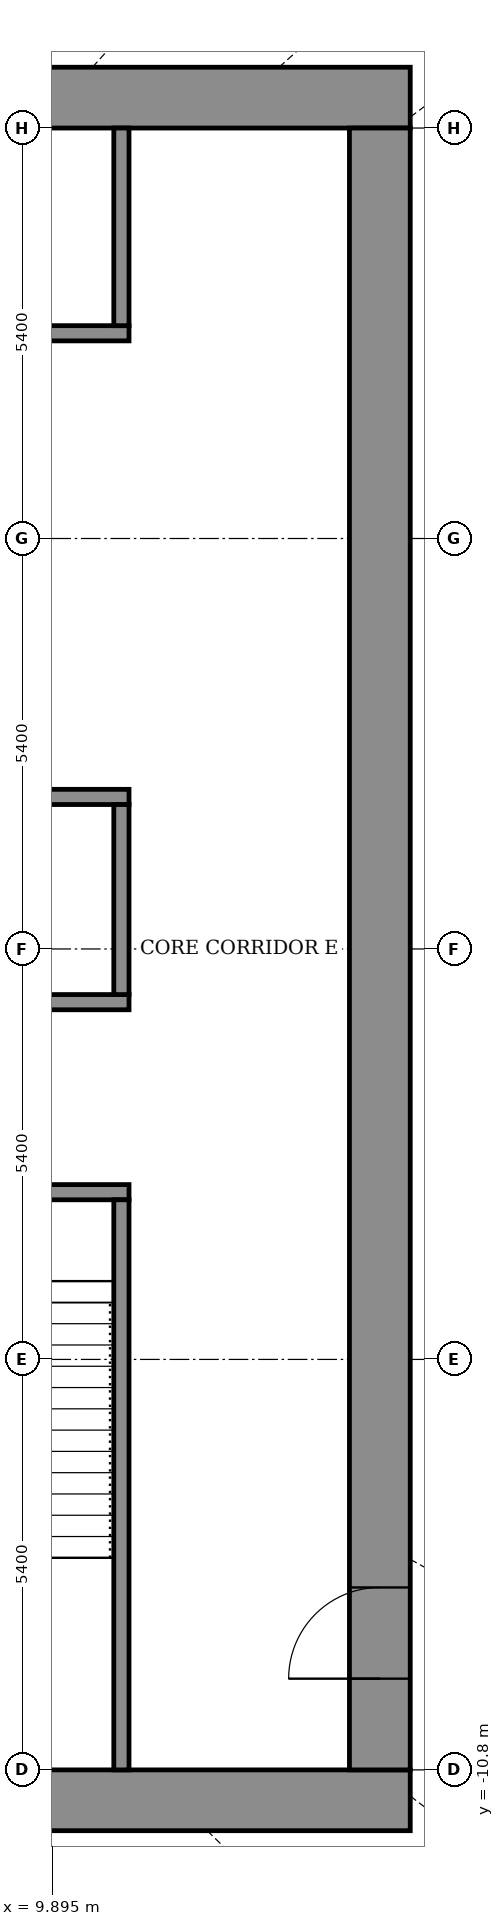
"""IFC4 building model, lengths in metres.
Left out: names, types, materials, properties, quantities, classifications, styles, units other than length and angle.
Written with IfcOpenShell. Run it as: python <this file> out.ifc"""

import sys

from ifc_helpers import new_model, si_unit, direction, frame, frame_2d, origin, place, context, subcontext, project, spatial, rectangle, extrude, element, fill, save


model = new_model("IFC4")
c1 = context("Model", 3, precision=1e-05, world=origin(), true_north=direction((0.0, 1.0)))
c2 = subcontext(c1, "Body", "Model", "MODEL_VIEW")
j1 = project(units=[si_unit("LENGTHUNIT", "METRE"), si_unit("PLANEANGLEUNIT", "RADIAN")], contexts=[c1])
p1 = place(None, origin())
s1 = spatial("IfcSite", under=j1, at=p1, CompositionType="ELEMENT")
p2 = place(p1, origin())
s2 = spatial("IfcBuilding", under=s1, at=p2, CompositionType="ELEMENT")
p3 = place(p2, frame((0.0, 0.0, 226.5)))
s3 = spatial("IfcBuildingStorey", under=s2, at=p3, CompositionType="ELEMENT", Elevation=226.5)
for number, where, z_axis, x_axis in (
    (1, (-14.6, -11.2, 0.0), (0.0, 0.0, 1.0), (1.0, 0.0, 0.0)),
    (2, (-14.6, 11.2, 0.0), (0.0, 0.0, 1.0), (1.0, 0.0, 0.0)),
):
    element("IfcWall", number, at=place(p3, frame(where, z_axis=z_axis, x_axis=x_axis)), inside=s3, PredefinedType="SHEAR", context=c2, shape_type="SweptSolid", body=[
        extrude(rectangle(XDim=29.2, YDim=0.8, at=frame_2d((14.6, 0.0))), origin(), (0.0, 0.0, 1.0), 4.6),
    ])
p4 = place(p3, frame((14.2, -10.8, 0.0), z_axis=(0.0, 0.0, 1.0), x_axis=(0.0, 1.0, 0.0)))
e3 = element("IfcWall", 3, at=p4, inside=s3, PredefinedType="SHEAR", context=c2, shape_type="SweptSolid", body=[
    extrude(rectangle(XDim=21.6, YDim=0.8, at=frame_2d((10.8, 0.0))), origin(), (0.0, 0.0, 1.0), 4.6),
])
p5 = place(p4, frame((1.2, 0.0, 0.0)))
e4 = element("IfcOpeningElement", 4, at=p5, cuts=e3, PredefinedType="OPENING", context=c2, shape_type="SweptSolid", body=[
    extrude(rectangle(XDim=1.2, YDim=2.1, at=frame_2d((0.6, 1.05))), frame((0.0, 0.41, 0.0), z_axis=(0.0, -1.0, 0.0), x_axis=(1.0, 0.0, 0.0)), (0.0, 0.0, 1.0), 0.82),
])
p6 = place(p3, frame((-10.9, -3.2, 0.0), z_axis=(0.0, 0.0, 1.0), x_axis=(1.0, 0.0, 0.0)))
e5 = element("IfcWall", 5, at=p6, inside=s3, PredefinedType="SHEAR", context=c2, shape_type="SweptSolid", body=[
    extrude(rectangle(XDim=21.8, YDim=0.2, at=frame_2d((10.9, 0.0))), origin(), (0.0, 0.0, 1.0), 4.05),
])
p7 = place(p6, frame((1.075, 0.0, 0.0)))
e6 = element("IfcOpeningElement", 6, at=p7, cuts=e5, PredefinedType="OPENING", context=c2, shape_type="SweptSolid", body=[
    extrude(rectangle(XDim=1.1, YDim=2.1, at=frame_2d((0.55, 1.05))), frame((0.0, 0.11, 0.0), z_axis=(0.0, -1.0, 0.0), x_axis=(1.0, 0.0, 0.0)), (0.0, 0.0, 1.0), 0.22),
])
p8 = place(p6, frame((10.325, 0.0, 0.0)))
e7 = element("IfcOpeningElement", 7, at=p8, cuts=e5, PredefinedType="OPENING", context=c2, shape_type="SweptSolid", body=[
    extrude(rectangle(XDim=1.1, YDim=2.1, at=frame_2d((0.55, 1.05))), frame((0.0, 0.11, 0.0), z_axis=(0.0, -1.0, 0.0), x_axis=(1.0, 0.0, 0.0)), (0.0, 0.0, 1.0), 0.22),
])
p9 = place(p6, frame((19.625, 0.0, 0.0)))
e8 = element("IfcOpeningElement", 8, at=p9, cuts=e5, PredefinedType="OPENING", context=c2, shape_type="SweptSolid", body=[
    extrude(rectangle(XDim=1.1, YDim=2.1, at=frame_2d((0.55, 1.05))), frame((0.0, 0.11, 0.0), z_axis=(0.0, -1.0, 0.0), x_axis=(1.0, 0.0, 0.0)), (0.0, 0.0, 1.0), 0.22),
])
p10 = place(p6, frame((5.7, 0.0, 0.0)))
e9 = element("IfcOpeningElement", 9, at=p10, cuts=e5, PredefinedType="OPENING", context=c2, shape_type="SweptSolid", body=[
    extrude(rectangle(XDim=1.1, YDim=2.1, at=frame_2d((0.55, 1.05))), frame((0.0, 0.11, 0.0), z_axis=(0.0, -1.0, 0.0), x_axis=(1.0, 0.0, 0.0)), (0.0, 0.0, 1.0), 0.22),
])
p11 = place(p6, frame((14.975, 0.0, 0.0)))
e10 = element("IfcOpeningElement", 10, at=p11, cuts=e5, PredefinedType="OPENING", context=c2, shape_type="SweptSolid", body=[
    extrude(rectangle(XDim=1.1, YDim=2.1, at=frame_2d((0.55, 1.05))), frame((0.0, 0.11, 0.0), z_axis=(0.0, -1.0, 0.0), x_axis=(1.0, 0.0, 0.0)), (0.0, 0.0, 1.0), 0.22),
])
p12 = place(p3, frame((-10.9, -0.7, 0.0), z_axis=(0.0, 0.0, 1.0), x_axis=(1.0, 0.0, 0.0)))
e11 = element("IfcWall", 11, at=p12, inside=s3, PredefinedType="SHEAR", context=c2, shape_type="SweptSolid", body=[
    extrude(rectangle(XDim=21.8, YDim=0.2, at=frame_2d((10.9, 0.0))), origin(), (0.0, 0.0, 1.0), 4.05),
])
p13 = place(p3, frame((-10.9, 2.0, 0.0), z_axis=(0.0, 0.0, 1.0), x_axis=(1.0, 0.0, 0.0)))
e12 = element("IfcWall", 12, at=p13, inside=s3, PredefinedType="SHEAR", context=c2, shape_type="SweptSolid", body=[
    extrude(rectangle(XDim=21.8, YDim=0.2, at=frame_2d((10.9, 0.0))), origin(), (0.0, 0.0, 1.0), 4.05),
])
p14 = place(p13, frame((4.95, 0.0, 0.0)))
e13 = element("IfcOpeningElement", 13, at=p14, cuts=e12, PredefinedType="OPENING", context=c2, shape_type="SweptSolid", body=[
    extrude(rectangle(XDim=1.1, YDim=2.1, at=frame_2d((0.55, 1.05))), frame((0.0, 0.11, 0.0), z_axis=(0.0, -1.0, 0.0), x_axis=(1.0, 0.0, 0.0)), (0.0, 0.0, 1.0), 0.22),
])
p15 = place(p13, frame((7.65, 0.0, 0.0)))
e14 = element("IfcOpeningElement", 14, at=p15, cuts=e12, PredefinedType="OPENING", context=c2, shape_type="SweptSolid", body=[
    extrude(rectangle(XDim=1.1, YDim=2.1, at=frame_2d((0.55, 1.05))), frame((0.0, 0.11, 0.0), z_axis=(0.0, -1.0, 0.0), x_axis=(1.0, 0.0, 0.0)), (0.0, 0.0, 1.0), 0.22),
])
p16 = place(p13, frame((10.35, 0.0, 0.0)))
e15 = element("IfcOpeningElement", 15, at=p16, cuts=e12, PredefinedType="OPENING", context=c2, shape_type="SweptSolid", body=[
    extrude(rectangle(XDim=1.1, YDim=2.1, at=frame_2d((0.55, 1.05))), frame((0.0, 0.11, 0.0), z_axis=(0.0, -1.0, 0.0), x_axis=(1.0, 0.0, 0.0)), (0.0, 0.0, 1.0), 0.22),
])
p17 = place(p13, frame((1.675, 0.0, 0.0)))
e16 = element("IfcOpeningElement", 16, at=p17, cuts=e12, PredefinedType="OPENING", context=c2, shape_type="SweptSolid", body=[
    extrude(rectangle(XDim=0.9, YDim=2.1, at=frame_2d((0.45, 1.05))), frame((0.0, 0.11, 0.0), z_axis=(0.0, -1.0, 0.0), x_axis=(1.0, 0.0, 0.0)), (0.0, 0.0, 1.0), 0.22),
])
p18 = place(p13, frame((16.525, 0.0, 0.0)))
e17 = element("IfcOpeningElement", 17, at=p18, cuts=e12, PredefinedType="OPENING", context=c2, shape_type="SweptSolid", body=[
    extrude(rectangle(XDim=0.9, YDim=2.1, at=frame_2d((0.45, 1.05))), frame((0.0, 0.11, 0.0), z_axis=(0.0, -1.0, 0.0), x_axis=(1.0, 0.0, 0.0)), (0.0, 0.0, 1.0), 0.22),
])
p19 = place(p3, frame((-10.9, 8.1, 0.0), z_axis=(0.0, 0.0, 1.0), x_axis=(1.0, 0.0, 0.0)))
e18 = element("IfcWall", 18, at=p19, inside=s3, PredefinedType="SHEAR", context=c2, shape_type="SweptSolid", body=[
    extrude(rectangle(XDim=21.8, YDim=0.2, at=frame_2d((10.9, 0.0))), origin(), (0.0, 0.0, 1.0), 4.05),
])
p20 = place(p19, frame((4.95, 0.0, 0.0)))
e19 = element("IfcOpeningElement", 19, at=p20, cuts=e18, PredefinedType="OPENING", context=c2, shape_type="SweptSolid", body=[
    extrude(rectangle(XDim=1.1, YDim=2.1, at=frame_2d((0.55, 1.05))), frame((0.0, 0.11, 0.0), z_axis=(0.0, -1.0, 0.0), x_axis=(1.0, 0.0, 0.0)), (0.0, 0.0, 1.0), 0.22),
])
p21 = place(p19, frame((7.65, 0.0, 0.0)))
e20 = element("IfcOpeningElement", 20, at=p21, cuts=e18, PredefinedType="OPENING", context=c2, shape_type="SweptSolid", body=[
    extrude(rectangle(XDim=1.1, YDim=2.1, at=frame_2d((0.55, 1.05))), frame((0.0, 0.11, 0.0), z_axis=(0.0, -1.0, 0.0), x_axis=(1.0, 0.0, 0.0)), (0.0, 0.0, 1.0), 0.22),
])
p22 = place(p19, frame((10.35, 0.0, 0.0)))
e21 = element("IfcOpeningElement", 21, at=p22, cuts=e18, PredefinedType="OPENING", context=c2, shape_type="SweptSolid", body=[
    extrude(rectangle(XDim=1.1, YDim=2.1, at=frame_2d((0.55, 1.05))), frame((0.0, 0.11, 0.0), z_axis=(0.0, -1.0, 0.0), x_axis=(1.0, 0.0, 0.0)), (0.0, 0.0, 1.0), 0.22),
])
p23 = place(p19, frame((1.675, 0.0, 0.0)))
e22 = element("IfcOpeningElement", 22, at=p23, cuts=e18, PredefinedType="OPENING", context=c2, shape_type="SweptSolid", body=[
    extrude(rectangle(XDim=0.9, YDim=2.1, at=frame_2d((0.45, 1.05))), frame((0.0, 0.11, 0.0), z_axis=(0.0, -1.0, 0.0), x_axis=(1.0, 0.0, 0.0)), (0.0, 0.0, 1.0), 0.22),
])
p24 = place(p19, frame((13.825, 0.0, 0.0)))
e23 = element("IfcOpeningElement", 23, at=p24, cuts=e18, PredefinedType="OPENING", context=c2, shape_type="SweptSolid", body=[
    extrude(rectangle(XDim=0.9, YDim=2.1, at=frame_2d((0.45, 1.05))), frame((0.0, 0.11, 0.0), z_axis=(0.0, -1.0, 0.0), x_axis=(1.0, 0.0, 0.0)), (0.0, 0.0, 1.0), 0.22),
])
p25 = place(p19, frame((18.55, 0.0, 0.0)))
e24 = element("IfcOpeningElement", 24, at=p25, cuts=e18, PredefinedType="OPENING", context=c2, shape_type="SweptSolid", body=[
    extrude(rectangle(XDim=0.9, YDim=2.1, at=frame_2d((0.45, 1.05))), frame((0.0, 0.11, 0.0), z_axis=(0.0, -1.0, 0.0), x_axis=(1.0, 0.0, 0.0)), (0.0, 0.0, 1.0), 0.22),
])
p26 = place(p3, frame((10.8, -10.8, 0.0), z_axis=(0.0, 0.0, 1.0), x_axis=(0.0, 1.0, 0.0)))
e25 = element("IfcWall", 25, at=p26, inside=s3, PredefinedType="SHEAR", context=c2, shape_type="SweptSolid", body=[
    extrude(rectangle(XDim=7.5, YDim=0.2, at=frame_2d((3.75, 0.0))), origin(), (0.0, 0.0, 1.0), 4.05),
])
p27 = place(p3, frame((10.8, -0.6, 0.0), z_axis=(0.0, 0.0, 1.0), x_axis=(0.0, 1.0, 0.0)))
e26 = element("IfcWall", 26, at=p27, inside=s3, PredefinedType="STANDARD", context=c2, shape_type="SweptSolid", body=[
    extrude(rectangle(XDim=2.5, YDim=0.2, at=frame_2d((1.25, 0.0))), origin(), (0.0, 0.0, 1.0), 4.05),
])
p28 = place(p3, frame((10.8, 8.2, 0.0), z_axis=(0.0, 0.0, 1.0), x_axis=(0.0, 1.0, 0.0)))
e27 = element("IfcWall", 27, at=p28, inside=s3, PredefinedType="STANDARD", context=c2, shape_type="SweptSolid", body=[
    extrude(rectangle(XDim=2.6, YDim=0.2, at=frame_2d((1.3, 0.0))), origin(), (0.0, 0.0, 1.0), 4.05),
])
p29 = place(p5, origin())
e28 = element("IfcDoor", 28, at=p29, inside=s3, OperationType="DOUBLE_DOOR_SINGLE_SWING", PredefinedType="DOOR", context=c2, shape_type="SweptSolid", body=[
    extrude(rectangle(XDim=1.2, YDim=2.1, at=frame_2d((0.6, 1.05))), frame((0.0, 0.025, 0.0), z_axis=(0.0, -1.0, 0.0), x_axis=(1.0, 0.0, 0.0)), (0.0, 0.0, 1.0), 0.05),
])
fill(e4, e28)
save(model, sys.argv[1])
